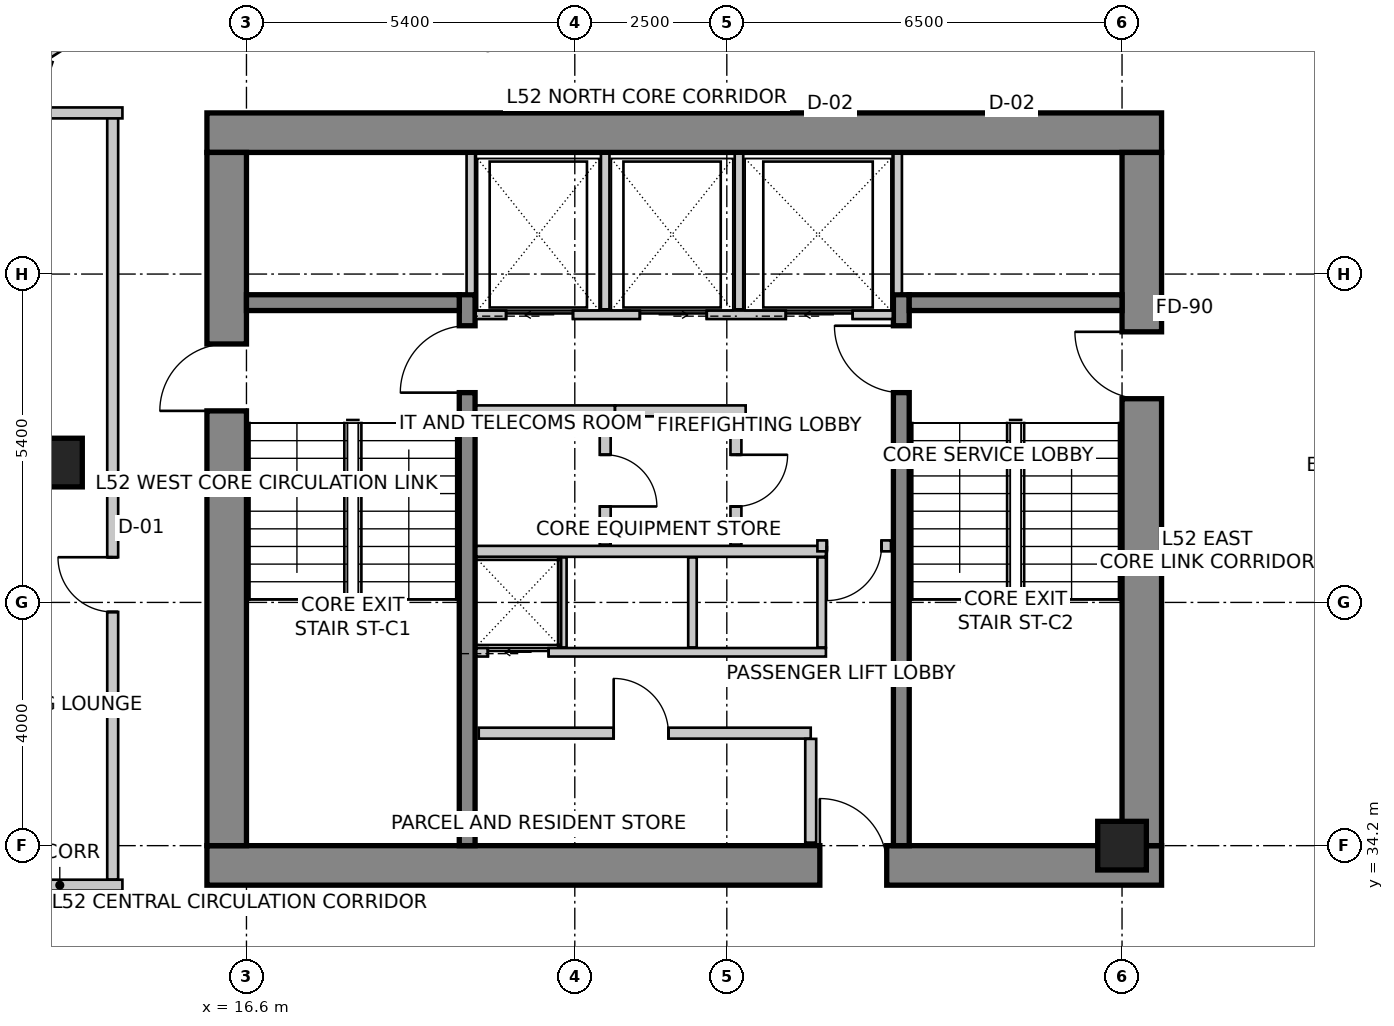
"""IFC4 building model, lengths in metres.
Left out: names, types, materials, properties, quantities, classifications, styles, units other than length and angle.
Written with IfcOpenShell. Run it as: python <this file> out.ifc"""

import sys

from ifc_helpers import new_model, si_unit, direction, frame, frame_2d, origin, origin_2d, place, context, subcontext, project, spatial, rectangle, extrude, source, transform, mapped, element, fill, save


model = new_model("IFC4")
c1 = context("Model", 3, precision=1e-05, world=origin(), true_north=direction((0.0, 1.0)))
c2 = subcontext(c1, "Body", "Model", "MODEL_VIEW")
j1 = project(units=[si_unit("LENGTHUNIT", "METRE"), si_unit("PLANEANGLEUNIT", "RADIAN")], contexts=[c1])
p1 = place(None, origin())
s1 = spatial("IfcSite", under=j1, at=p1, CompositionType="ELEMENT")
p2 = place(p1, origin())
s2 = spatial("IfcBuilding", under=s1, at=p2, CompositionType="ELEMENT")
p3 = place(p2, frame((0.0, 0.0, 207.9)))
s3 = spatial("IfcBuildingStorey", under=s2, at=p3, CompositionType="ELEMENT", Elevation=207.9)
p4 = place(p3, frame((15.95, 45.925, 0.0), z_axis=(0.0, 0.0, 1.0), x_axis=(1.0, 0.0, 0.0)))
e1 = element("IfcWall", 1, at=p4, inside=s3, PredefinedType="SHEAR", context=c2, shape_type="SweptSolid", body=[
    extrude(rectangle(XDim=15.7, YDim=0.65, at=frame_2d((7.85, 0.0))), origin(), (0.0, 0.0, 1.0), 3.5),
])
p5 = place(p3, frame((15.95, 33.875, 0.0), z_axis=(0.0, 0.0, 1.0), x_axis=(1.0, 0.0, 0.0)))
e2 = element("IfcWall", 2, at=p5, inside=s3, PredefinedType="SHEAR", context=c2, shape_type="SweptSolid", body=[
    extrude(rectangle(XDim=15.7, YDim=0.65, at=frame_2d((7.85, 0.0))), origin(), (0.0, 0.0, 1.0), 3.5),
])
m1 = source(origin(), c2, "Body", "SweptSolid", [
    extrude(rectangle(XDim=1.1, YDim=2.15, at=frame_2d((0.55, 1.075))), frame((0.0, 0.335, 0.0), z_axis=(0.0, -1.0, 0.0), x_axis=(1.0, 0.0, 0.0)), (0.0, 0.0, 1.0), 0.67),
])
p6 = place(p5, frame((10.08, 0.0, 0.0)))
e3 = element("IfcOpeningElement", 3, at=p6, cuts=e2, PredefinedType="OPENING", context=c2, shape_type="MappedRepresentation", body=[
    mapped(m1, transform((0.0, 0.0, 0.0), scale=1.0)),
])
p7 = place(p3, frame((16.275, 34.2, 0.0), z_axis=(0.0, 0.0, 1.0), x_axis=(0.0, 1.0, 0.0)))
e4 = element("IfcWall", 4, at=p7, inside=s3, PredefinedType="SHEAR", context=c2, shape_type="SweptSolid", body=[
    extrude(rectangle(XDim=11.4, YDim=0.65, at=frame_2d((5.7, 0.0))), origin(), (0.0, 0.0, 1.0), 3.5),
])
p8 = place(p7, frame((7.15, 0.0, 0.0)))
e5 = element("IfcOpeningElement", 5, at=p8, cuts=e4, PredefinedType="OPENING", context=c2, shape_type="MappedRepresentation", body=[
    mapped(m1, transform((0.0, 0.0, 0.0), scale=1.0)),
])
p9 = place(p3, frame((31.325, 34.2, 0.0), z_axis=(0.0, 0.0, 1.0), x_axis=(0.0, 1.0, 0.0)))
e6 = element("IfcWall", 6, at=p9, inside=s3, PredefinedType="SHEAR", context=c2, shape_type="SweptSolid", body=[
    extrude(rectangle(XDim=11.4, YDim=0.65, at=frame_2d((5.7, 0.0))), origin(), (0.0, 0.0, 1.0), 3.5),
])
p10 = place(p9, frame((7.35, 0.0, 0.0)))
e7 = element("IfcOpeningElement", 7, at=p10, cuts=e6, PredefinedType="OPENING", context=c2, shape_type="MappedRepresentation", body=[
    mapped(m1, transform((0.0, 0.0, 0.0), scale=1.0)),
])
p11 = place(p3, frame((20.23, 34.2, 0.0), z_axis=(0.0, 0.0, 1.0), x_axis=(0.0, 1.0, 0.0)))
e8 = element("IfcWall", 8, at=p11, inside=s3, PredefinedType="SHEAR", context=c2, shape_type="SweptSolid", body=[
    extrude(rectangle(XDim=9.06, YDim=0.26, at=frame_2d((4.53, 0.0))), origin(), (0.0, 0.0, 1.0), 3.5),
])
m2 = source(origin(), c2, "Body", "SweptSolid", [
    extrude(rectangle(XDim=1.1, YDim=2.15, at=frame_2d((0.55, 1.075))), frame((0.0, 0.14, 0.0), z_axis=(0.0, -1.0, 0.0), x_axis=(1.0, 0.0, 0.0)), (0.0, 0.0, 1.0), 0.28),
])
p12 = place(p11, frame((7.45, 0.0, 0.0)))
e9 = element("IfcOpeningElement", 9, at=p12, cuts=e8, PredefinedType="OPENING", context=c2, shape_type="MappedRepresentation", body=[
    mapped(m2, transform((0.0, 0.0, 0.0), scale=1.0)),
])
p13 = place(p3, frame((27.37, 34.2, 0.0), z_axis=(0.0, 0.0, 1.0), x_axis=(0.0, 1.0, 0.0)))
e10 = element("IfcWall", 10, at=p13, inside=s3, PredefinedType="SHEAR", context=c2, shape_type="SweptSolid", body=[
    extrude(rectangle(XDim=9.06, YDim=0.26, at=frame_2d((4.53, 0.0))), origin(), (0.0, 0.0, 1.0), 3.5),
])
p14 = place(p13, frame((7.45, 0.0, 0.0)))
e11 = element("IfcOpeningElement", 11, at=p14, cuts=e10, PredefinedType="OPENING", context=c2, shape_type="MappedRepresentation", body=[
    mapped(m2, transform((0.0, 0.0, 0.0), scale=1.0)),
])
for number, where, z_axis, x_axis in (
    (12, (16.6, 43.13, 0.0), (0.0, 0.0, 1.0), (1.0, 0.0, 0.0)),
    (13, (27.5, 43.13, 0.0), (0.0, 0.0, 1.0), (1.0, 0.0, 0.0)),
):
    element("IfcWall", number, at=place(p3, frame(where, z_axis=z_axis, x_axis=x_axis)), inside=s3, PredefinedType="SHEAR", context=c2, shape_type="SweptSolid", body=[
        extrude(rectangle(XDim=3.5, YDim=0.26, at=frame_2d((1.75, 0.0))), origin(), (0.0, 0.0, 1.0), 3.5),
    ])
m3 = source(origin(), c2, "Body", "SweptSolid", [
    extrude(rectangle(XDim=0.8, YDim=0.8, at=origin_2d()), origin(), (0.0, 0.0, 1.0), 3.5),
])
for number, where, z_axis, x_axis in (
    (14, (13.5, 40.5, 0.0), (0.0, 0.0, 1.0), (1.0, 0.0, 0.0)),
    (15, (31.0, 34.2, 0.0), (0.0, 0.0, 1.0), (1.0, 0.0, 0.0)),
):
    element("IfcColumn", number, at=place(p3, frame(where, z_axis=z_axis, x_axis=x_axis)), inside=s3, PredefinedType="COLUMN", context=c2, shape_type="MappedRepresentation", body=[
        mapped(m3, transform((0.0, 0.0, 0.0), scale=1.0)),
    ])
p15 = place(p3, frame((21.875, 52.742, 0.0), z_axis=(0.0, 0.0, 1.0), x_axis=(-0.843666375448, -0.536867811419, 0.0)))
e16 = element("IfcWall", 16, at=p15, inside=s3, PredefinedType="SOLIDWALL", context=c2, shape_type="SweptSolid", body=[
    extrude(rectangle(XDim=10.284, YDim=0.3, at=frame_2d((5.142, 0.0))), origin(), (0.0, 0.0, 1.0), 3.2),
])
m4 = source(origin(), c2, "Body", "SweptSolid", [
    extrude(rectangle(XDim=2.1, YDim=2.0, at=frame_2d((1.05, 1.0))), frame((0.0, 0.16, 0.0), z_axis=(0.0, -1.0, 0.0), x_axis=(1.0, 0.0, 0.0)), (0.0, 0.0, 1.0), 0.32),
])
p16 = place(p15, frame((3.457, 0.0, 0.85)))
e17 = element("IfcOpeningElement", 17, at=p16, cuts=e16, PredefinedType="OPENING", context=c2, shape_type="MappedRepresentation", body=[
    mapped(m4, transform((0.0, 0.0, 0.0), scale=1.0)),
])
p17 = place(p3, frame((13.269, 47.134, 0.0), z_axis=(0.0, 0.0, 1.0), x_axis=(-0.319920776449, -0.947444297464, 0.0)))
e18 = element("IfcWall", 18, at=p17, inside=s3, PredefinedType="SOLIDWALL", context=c2, shape_type="SweptSolid", body=[
    extrude(rectangle(XDim=16.133, YDim=0.3, at=frame_2d((8.067, 0.0))), origin(), (0.0, 0.0, 1.0), 3.2),
])
m5 = source(origin(), c2, "Body", "SweptSolid", [
    extrude(rectangle(XDim=2.4, YDim=2.2, at=frame_2d((1.2, 1.1))), frame((0.0, 0.16, 0.0), z_axis=(0.0, -1.0, 0.0), x_axis=(1.0, 0.0, 0.0)), (0.0, 0.0, 1.0), 0.32),
])
p18 = place(p17, frame((2.363, 0.0, 0.85)))
e19 = element("IfcOpeningElement", 19, at=p18, cuts=e18, PredefinedType="OPENING", context=c2, shape_type="MappedRepresentation", body=[
    mapped(m5, transform((0.0, 0.0, 0.0), scale=1.0)),
])
p19 = place(p17, frame((7.41, 0.0, 0.85)))
e20 = element("IfcOpeningElement", 20, at=p19, cuts=e18, PredefinedType="OPENING", context=c2, shape_type="MappedRepresentation", body=[
    mapped(m4, transform((0.0, 0.0, 0.0), scale=1.0)),
])
p20 = place(p17, frame((12.157, 0.0, 0.85)))
e21 = element("IfcOpeningElement", 21, at=p20, cuts=e18, PredefinedType="OPENING", context=c2, shape_type="MappedRepresentation", body=[
    mapped(m5, transform((0.0, 0.0, 0.0), scale=1.0)),
])
p21 = place(p3, frame((20.37, 42.93, 0.0), z_axis=(0.0, 0.0, 1.0), x_axis=(1.0, 0.0, 0.0)))
e22 = element("IfcWall", 22, at=p21, inside=s3, PredefinedType="SOLIDWALL", context=c2, shape_type="SweptSolid", body=[
    extrude(rectangle(XDim=6.86, YDim=0.14, at=frame_2d((3.43, 0.0))), origin(), (0.0, 0.0, 1.0), 3.2),
])
m6 = source(origin(), c2, "Body", "SweptSolid", [
    extrude(rectangle(XDim=1.1, YDim=2.15, at=frame_2d((0.55, 1.075))), frame((0.0, 0.08, 0.0), z_axis=(0.0, -1.0, 0.0), x_axis=(1.0, 0.0, 0.0)), (0.0, 0.0, 1.0), 0.16),
])
p22 = place(p21, frame((0.5, 0.0, 0.0)))
e23 = element("IfcOpeningElement", 23, at=p22, cuts=e22, PredefinedType="OPENING", context=c2, shape_type="MappedRepresentation", body=[
    mapped(m6, transform((0.0, 0.0, 0.0), scale=1.0)),
])
p23 = place(p21, frame((2.7, 0.0, 0.0)))
e24 = element("IfcOpeningElement", 24, at=p23, cuts=e22, PredefinedType="OPENING", context=c2, shape_type="MappedRepresentation", body=[
    mapped(m6, transform((0.0, 0.0, 0.0), scale=1.0)),
])
p24 = place(p21, frame((5.1, 0.0, 0.0)))
e25 = element("IfcOpeningElement", 25, at=p24, cuts=e22, PredefinedType="OPENING", context=c2, shape_type="MappedRepresentation", body=[
    mapped(m6, transform((0.0, 0.0, 0.0), scale=1.0)),
])
for number, where, z_axis, x_axis in (
    (26, (20.29, 43.28, 0.0), (0.0, 0.0, 1.0), (0.0, 1.0, 0.0)),
    (27, (27.31, 43.28, 0.0), (0.0, 0.0, 1.0), (0.0, 1.0, 0.0)),
):
    element("IfcWall", number, at=place(p3, frame(where, z_axis=z_axis, x_axis=x_axis)), inside=s3, PredefinedType="SOLIDWALL", context=c2, shape_type="SweptSolid", body=[
        extrude(rectangle(XDim=2.3, YDim=0.14, at=frame_2d((1.15, 0.0))), origin(), (0.0, 0.0, 1.0), 3.2),
    ])
for number, where, z_axis, x_axis in (
    (28, (22.5, 43.02, 0.0), (0.0, 0.0, 1.0), (0.0, 1.0, 0.0)),
    (29, (24.7, 43.02, 0.0), (0.0, 0.0, 1.0), (0.0, 1.0, 0.0)),
):
    element("IfcWall", number, at=place(p3, frame(where, z_axis=z_axis, x_axis=x_axis)), inside=s3, PredefinedType="SOLIDWALL", context=c2, shape_type="SweptSolid", body=[
        extrude(rectangle(XDim=2.56, YDim=0.14, at=frame_2d((1.28, 0.0))), origin(), (0.0, 0.0, 1.0), 3.2),
    ])
p25 = place(p3, frame((20.38, 37.38, 0.0), z_axis=(0.0, 0.0, 1.0), x_axis=(1.0, 0.0, 0.0)))
e30 = element("IfcWall", 30, at=p25, inside=s3, PredefinedType="SOLIDWALL", context=c2, shape_type="SweptSolid", body=[
    extrude(rectangle(XDim=5.75, YDim=0.14, at=frame_2d((2.875, 0.0))), origin(), (0.0, 0.0, 1.0), 3.2),
])
m7 = source(origin(), c2, "Body", "SweptSolid", [
    extrude(rectangle(XDim=1.0, YDim=2.15, at=frame_2d((0.5, 1.075))), frame((0.0, 0.08, 0.0), z_axis=(0.0, -1.0, 0.0), x_axis=(1.0, 0.0, 0.0)), (0.0, 0.0, 1.0), 0.16),
])
p26 = place(p25, frame((0.19, 0.0, 0.0)))
e31 = element("IfcOpeningElement", 31, at=p26, cuts=e30, PredefinedType="OPENING", context=c2, shape_type="MappedRepresentation", body=[
    mapped(m7, transform((0.0, 0.0, 0.0), scale=1.0)),
])
p27 = place(p3, frame((20.38, 39.04, 0.0), z_axis=(0.0, 0.0, 1.0), x_axis=(1.0, 0.0, 0.0)))
e32 = element("IfcWall", 32, at=p27, inside=s3, PredefinedType="SOLIDWALL", context=c2, shape_type="SweptSolid", body=[
    extrude(rectangle(XDim=5.75, YDim=0.18, at=frame_2d((2.875, 0.0))), origin(), (0.0, 0.0, 1.0), 3.2),
])
for number, where, z_axis, x_axis in (
    (33, (26.06, 37.46, 0.0), (0.0, 0.0, 1.0), (0.0, 1.0, 0.0)),
    (34, (21.795, 37.46, 0.0), (0.0, 0.0, 1.0), (0.0, 1.0, 0.0)),
    (35, (23.935, 37.46, 0.0), (0.0, 0.0, 1.0), (0.0, 1.0, 0.0)),
):
    element("IfcWall", number, at=place(p3, frame(where, z_axis=z_axis, x_axis=x_axis)), inside=s3, PredefinedType="SOLIDWALL", context=c2, shape_type="SweptSolid", body=[
        extrude(rectangle(XDim=1.48, YDim=0.14, at=frame_2d((0.74, 0.0))), origin(), (0.0, 0.0, 1.0), 3.2),
    ])
p28 = place(p3, frame((22.66, 41.35, 0.0), z_axis=(0.0, 0.0, 1.0), x_axis=(-1.0, 0.0, 0.0)))
e36 = element("IfcWall", 36, at=p28, inside=s3, PredefinedType="PARTITIONING", context=c2, shape_type="SweptSolid", body=[
    extrude(rectangle(XDim=2.28, YDim=0.18, at=frame_2d((1.14, 0.0))), origin(), (0.0, 0.0, 1.0), 3.2),
])
p29 = place(p3, frame((24.81, 41.35, 0.0), z_axis=(0.0, 0.0, 1.0), x_axis=(-1.0, 0.0, 0.0)))
e37 = element("IfcWall", 37, at=p29, inside=s3, PredefinedType="PARTITIONING", context=c2, shape_type="SweptSolid", body=[
    extrude(rectangle(XDim=2.148, YDim=0.18, at=frame_2d((1.074, 0.0))), origin(), (0.0, 0.0, 1.0), 3.2),
])
p30 = place(p3, frame((22.5, 41.256, 0.0), z_axis=(0.0, 0.0, 1.0), x_axis=(0.0, -1.0, 0.0)))
e38 = element("IfcWall", 38, at=p30, inside=s3, PredefinedType="PARTITIONING", context=c2, shape_type="SweptSolid", body=[
    extrude(rectangle(XDim=2.106, YDim=0.18, at=frame_2d((1.053, 0.0))), origin(), (0.0, 0.0, 1.0), 3.2),
])
m8 = source(origin(), c2, "Body", "SweptSolid", [
    extrude(rectangle(XDim=0.85, YDim=2.15, at=frame_2d((0.425, 1.075))), frame((0.0, 0.1, 0.0), z_axis=(0.0, -1.0, 0.0), x_axis=(1.0, 0.0, 0.0)), (0.0, 0.0, 1.0), 0.2),
])
p31 = place(p30, frame((0.628, 0.0, 0.0)))
e39 = element("IfcOpeningElement", 39, at=p31, cuts=e38, PredefinedType="OPENING", context=c2, shape_type="MappedRepresentation", body=[
    mapped(m8, transform((0.0, 0.0, 0.0), scale=1.0)),
])
p32 = place(p3, frame((24.65, 41.256, 0.0), z_axis=(0.0, 0.0, 1.0), x_axis=(0.0, -1.0, 0.0)))
e40 = element("IfcWall", 40, at=p32, inside=s3, PredefinedType="PARTITIONING", context=c2, shape_type="SweptSolid", body=[
    extrude(rectangle(XDim=2.106, YDim=0.18, at=frame_2d((1.053, 0.0))), origin(), (0.0, 0.0, 1.0), 3.2),
])
p33 = place(p32, frame((0.628, 0.0, 0.0)))
e41 = element("IfcOpeningElement", 41, at=p33, cuts=e40, PredefinedType="OPENING", context=c2, shape_type="MappedRepresentation", body=[
    mapped(m8, transform((0.0, 0.0, 0.0), scale=1.0)),
])
p34 = place(p3, frame((27.2, 39.13, 0.0), z_axis=(0.0, 0.0, 1.0), x_axis=(-1.0, 0.0, 0.0)))
e42 = element("IfcWall", 42, at=p34, inside=s3, PredefinedType="PARTITIONING", context=c2, shape_type="SweptSolid", body=[
    extrude(rectangle(XDim=1.21, YDim=0.18, at=frame_2d((0.605, 0.0))), origin(), (0.0, 0.0, 1.0), 3.2),
])
m9 = source(origin(), c2, "Body", "SweptSolid", [
    extrude(rectangle(XDim=0.9, YDim=2.15, at=frame_2d((0.45, 1.075))), frame((0.0, 0.1, 0.0), z_axis=(0.0, -1.0, 0.0), x_axis=(1.0, 0.0, 0.0)), (0.0, 0.0, 1.0), 0.2),
])
p35 = place(p34, frame((0.155, 0.0, 0.0)))
e43 = element("IfcOpeningElement", 43, at=p35, cuts=e42, PredefinedType="OPENING", context=c2, shape_type="MappedRepresentation", body=[
    mapped(m9, transform((0.0, 0.0, 0.0), scale=1.0)),
])
p36 = place(p3, frame((20.42, 36.05, 0.0), z_axis=(0.0, 0.0, 1.0), x_axis=(1.0, 0.0, 0.0)))
e44 = element("IfcWall", 44, at=p36, inside=s3, PredefinedType="PARTITIONING", context=c2, shape_type="SweptSolid", body=[
    extrude(rectangle(XDim=5.46, YDim=0.18, at=frame_2d((2.73, 0.0))), origin(), (0.0, 0.0, 1.0), 3.2),
])
p37 = place(p36, frame((2.219, 0.0, 0.0)))
e45 = element("IfcOpeningElement", 45, at=p37, cuts=e44, PredefinedType="OPENING", context=c2, shape_type="MappedRepresentation", body=[
    mapped(m9, transform((0.0, 0.0, 0.0), scale=1.0)),
])
p38 = place(p3, frame((25.88, 35.956, 0.0), z_axis=(0.0, 0.0, 1.0), x_axis=(0.0, -1.0, 0.0)))
e46 = element("IfcWall", 46, at=p38, inside=s3, PredefinedType="PARTITIONING", context=c2, shape_type="SweptSolid", body=[
    extrude(rectangle(XDim=1.706, YDim=0.18, at=frame_2d((0.853, 0.0))), origin(), (0.0, 0.0, 1.0), 2.492),
])
p39 = place(p3, frame((12.5, 33.55, 0.0), z_axis=(0.0, 0.0, 1.0), x_axis=(1.0, 0.0, 0.0)))
e47 = element("IfcWall", 47, at=p39, inside=s3, PredefinedType="PARTITIONING", context=c2, shape_type="SweptSolid", body=[
    extrude(rectangle(XDim=2.06, YDim=0.18, at=frame_2d((1.03, 0.0))), origin(), (0.0, 0.0, 1.0), 3.2),
])
p40 = place(p3, frame((14.4, 33.644, 0.0), z_axis=(0.0, 0.0, 1.0), x_axis=(0.0, 1.0, 0.0)))
e48 = element("IfcWall", 48, at=p40, inside=s3, PredefinedType="PARTITIONING", context=c2, shape_type="SweptSolid", body=[
    extrude(rectangle(XDim=12.606, YDim=0.18, at=frame_2d((6.303, 0.0))), origin(), (0.0, 0.0, 1.0), 3.2),
])
p41 = place(p40, frame((4.399, 0.0, 0.0)))
e49 = element("IfcOpeningElement", 49, at=p41, cuts=e48, PredefinedType="OPENING", context=c2, shape_type="MappedRepresentation", body=[
    mapped(m9, transform((0.0, 0.0, 0.0), scale=1.0)),
])
p42 = place(p3, frame((14.56, 46.25, 0.0), z_axis=(0.0, 0.0, 1.0), x_axis=(-1.0, 0.0, 0.0)))
e50 = element("IfcWall", 50, at=p42, inside=s3, PredefinedType="PARTITIONING", context=c2, shape_type="SweptSolid", body=[
    extrude(rectangle(XDim=1.469, YDim=0.18, at=frame_2d((0.734, 0.0))), origin(), (0.0, 0.0, 1.0), 3.2),
])
m10 = source(origin(), c2, "Body", "SweptSolid", [
    extrude(rectangle(XDim=1.1, YDim=2.15, at=frame_2d((0.55, 1.075))), frame((0.0, 0.025, 0.0), z_axis=(0.0, -1.0, 0.0), x_axis=(1.0, 0.0, 0.0)), (0.0, 0.0, 1.0), 0.05),
])
p43 = place(p22, origin())
e51 = element("IfcDoor", 51, at=p43, inside=s3, OperationType="SLIDING_TO_LEFT", PredefinedType="DOOR", context=c2, shape_type="MappedRepresentation", body=[
    mapped(m10, transform((0.0, 0.0, 0.0), scale=1.0)),
])
fill(e23, e51)
p44 = place(p23, origin())
e52 = element("IfcDoor", 52, at=p44, inside=s3, OperationType="SLIDING_TO_RIGHT", PredefinedType="DOOR", context=c2, shape_type="MappedRepresentation", body=[
    mapped(m10, transform((0.0, 0.0, 0.0), scale=1.0)),
])
fill(e24, e52)
m11 = source(origin(), c2, "Body", "SweptSolid", [
    extrude(rectangle(XDim=1.1, YDim=2.15, at=frame_2d((0.55, 1.075))), frame((0.0, 0.025, 0.0), z_axis=(0.0, -1.0, 0.0), x_axis=(1.0, 0.0, 0.0)), (0.0, 0.0, 1.0), 0.05),
])
p45 = place(p24, origin())
e53 = element("IfcDoor", 53, at=p45, inside=s3, OperationType="SLIDING_TO_LEFT", PredefinedType="DOOR", context=c2, shape_type="MappedRepresentation", body=[
    mapped(m11, transform((0.0, 0.0, 0.0), scale=1.0)),
])
fill(e25, e53)
m12 = source(origin(), c2, "Body", "SweptSolid", [
    extrude(rectangle(XDim=1.0, YDim=2.15, at=frame_2d((0.5, 1.075))), frame((0.0, 0.025, 0.0), z_axis=(0.0, -1.0, 0.0), x_axis=(1.0, 0.0, 0.0)), (0.0, 0.0, 1.0), 0.05),
])
p46 = place(p26, origin())
e54 = element("IfcDoor", 54, at=p46, inside=s3, OperationType="SLIDING_TO_LEFT", PredefinedType="DOOR", context=c2, shape_type="MappedRepresentation", body=[
    mapped(m12, transform((0.0, 0.0, 0.0), scale=1.0)),
])
fill(e31, e54)
m13 = source(origin(), c2, "Body", "SweptSolid", [
    extrude(rectangle(XDim=1.1, YDim=2.15, at=frame_2d((0.55, 1.075))), frame((0.0, 0.025, 0.0), z_axis=(0.0, -1.0, 0.0), x_axis=(1.0, 0.0, 0.0)), (0.0, 0.0, 1.0), 0.05),
])
p47 = place(p12, origin())
e55 = element("IfcDoor", 55, at=p47, inside=s3, OperationType="SINGLE_SWING_LEFT", PredefinedType="DOOR", context=c2, shape_type="MappedRepresentation", body=[
    mapped(m13, transform((0.0, 0.0, 0.0), scale=1.0)),
])
fill(e9, e55)
p48 = place(p14, origin())
e56 = element("IfcDoor", 56, at=p48, inside=s3, OperationType="SINGLE_SWING_RIGHT", PredefinedType="DOOR", context=c2, shape_type="MappedRepresentation", body=[
    mapped(m13, transform((0.0, 0.0, 0.0), scale=1.0)),
])
fill(e11, e56)
p49 = place(p8, origin())
e57 = element("IfcDoor", 57, at=p49, inside=s3, OperationType="SINGLE_SWING_LEFT", PredefinedType="DOOR", context=c2, shape_type="MappedRepresentation", body=[
    mapped(m13, transform((0.0, 0.0, 0.0), scale=1.0)),
])
fill(e5, e57)
p50 = place(p10, origin())
e58 = element("IfcDoor", 58, at=p50, inside=s3, OperationType="SINGLE_SWING_RIGHT", PredefinedType="DOOR", context=c2, shape_type="MappedRepresentation", body=[
    mapped(m13, transform((0.0, 0.0, 0.0), scale=1.0)),
])
fill(e7, e58)
p51 = place(p6, origin())
e59 = element("IfcDoor", 59, at=p51, inside=s3, OperationType="SINGLE_SWING_LEFT", PredefinedType="DOOR", context=c2, shape_type="MappedRepresentation", body=[
    mapped(m13, transform((0.0, 0.0, 0.0), scale=1.0)),
])
fill(e3, e59)
m14 = source(origin(), c2, "Body", "SweptSolid", [
    extrude(rectangle(XDim=0.85, YDim=2.15, at=frame_2d((0.425, 1.075))), frame((0.0, 0.025, 0.0), z_axis=(0.0, -1.0, 0.0), x_axis=(1.0, 0.0, 0.0)), (0.0, 0.0, 1.0), 0.05),
])
p52 = place(p31, origin())
e60 = element("IfcDoor", 60, at=p52, inside=s3, OperationType="SINGLE_SWING_RIGHT", PredefinedType="DOOR", context=c2, shape_type="MappedRepresentation", body=[
    mapped(m14, transform((0.0, 0.0, 0.0), scale=1.0)),
])
fill(e39, e60)
p53 = place(p33, origin())
e61 = element("IfcDoor", 61, at=p53, inside=s3, OperationType="SINGLE_SWING_LEFT", PredefinedType="DOOR", context=c2, shape_type="MappedRepresentation", body=[
    mapped(m14, transform((0.0, 0.0, 0.0), scale=1.0)),
])
fill(e41, e61)
m15 = source(origin(), c2, "Body", "SweptSolid", [
    extrude(rectangle(XDim=0.9, YDim=2.15, at=frame_2d((0.45, 1.075))), frame((0.0, 0.025, 0.0), z_axis=(0.0, -1.0, 0.0), x_axis=(1.0, 0.0, 0.0)), (0.0, 0.0, 1.0), 0.05),
])
p54 = place(p35, origin())
e62 = element("IfcDoor", 62, at=p54, inside=s3, OperationType="SINGLE_SWING_RIGHT", PredefinedType="DOOR", context=c2, shape_type="MappedRepresentation", body=[
    mapped(m15, transform((0.0, 0.0, 0.0), scale=1.0)),
])
fill(e43, e62)
p55 = place(p37, origin())
e63 = element("IfcDoor", 63, at=p55, inside=s3, OperationType="SINGLE_SWING_LEFT", PredefinedType="DOOR", context=c2, shape_type="MappedRepresentation", body=[
    mapped(m15, transform((0.0, 0.0, 0.0), scale=1.0)),
])
fill(e45, e63)
m16 = source(origin(), c2, "Body", "SweptSolid", [
    extrude(rectangle(XDim=0.9, YDim=2.15, at=frame_2d((0.45, 1.075))), frame((0.0, 0.025, 0.0), z_axis=(0.0, -1.0, 0.0), x_axis=(1.0, 0.0, 0.0)), (0.0, 0.0, 1.0), 0.05),
])
p56 = place(p41, origin())
e64 = element("IfcDoor", 64, at=p56, inside=s3, OperationType="SINGLE_SWING_RIGHT", PredefinedType="DOOR", context=c2, shape_type="MappedRepresentation", body=[
    mapped(m16, transform((0.0, 0.0, 0.0), scale=1.0)),
])
fill(e49, e64)
save(model, sys.argv[1])
